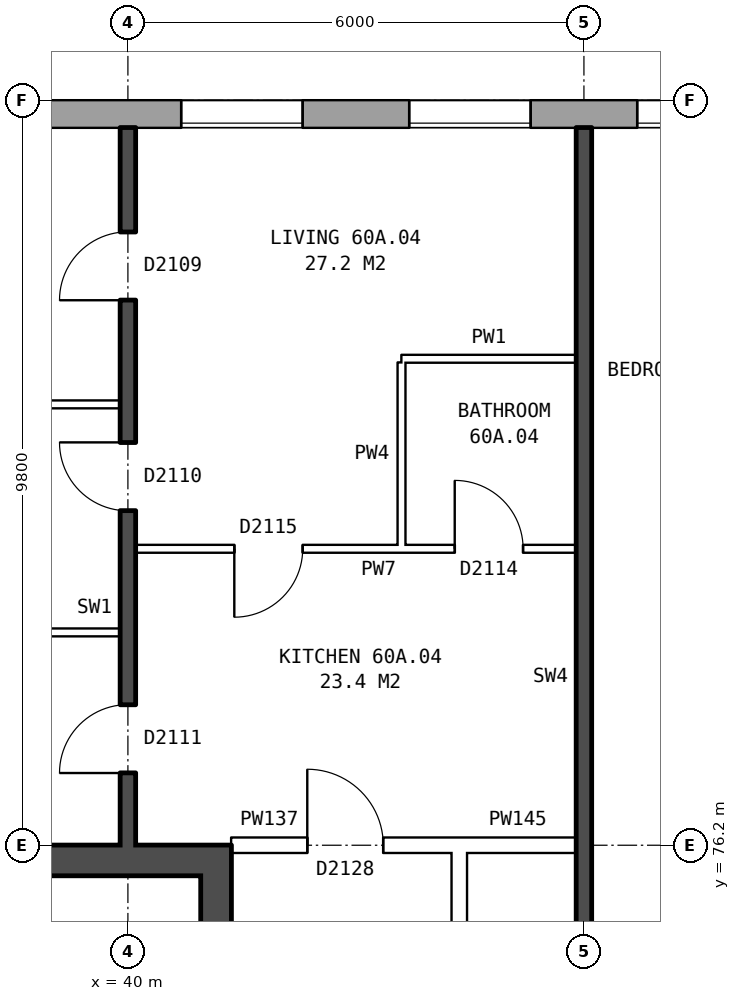
"""IFC4 building model, lengths in metres.
Left out: names, types, materials, properties, quantities, classifications, styles, units other than length and angle.
Written with IfcOpenShell. Run it as: python <this file> out.ifc"""

import sys

from ifc_helpers import new_model, si_unit, direction, frame, frame_2d, origin, place, context, subcontext, project, spatial, rectangle, extrude, element, fill, save


model = new_model("IFC4")
c1 = context("Model", 3, precision=1e-05, world=origin(), true_north=direction((0.0, 1.0)))
c2 = subcontext(c1, "Body", "Model", "MODEL_VIEW")
j1 = project(units=[si_unit("LENGTHUNIT", "METRE"), si_unit("PLANEANGLEUNIT", "RADIAN")], contexts=[c1])
p1 = place(None, origin())
s1 = spatial("IfcSite", under=j1, at=p1, CompositionType="ELEMENT")
p2 = place(p1, origin())
s2 = spatial("IfcBuilding", under=s1, at=p2, CompositionType="ELEMENT")
p3 = place(p2, frame((0.0, 0.0, 212.1)))
s3 = spatial("IfcBuildingStorey", under=s2, at=p3, CompositionType="ELEMENT", Elevation=212.1)
p4 = place(p3, frame((74.95, 85.82, 0.0), z_axis=(0.0, 0.0, 1.0), x_axis=(-1.0, 0.0, 0.0)))
e1 = element("IfcWall", 1, at=p4, inside=s3, PredefinedType="STANDARD", context=c2, shape_type="SweptSolid", body=[
    extrude(rectangle(XDim=39.875, YDim=0.36, at=frame_2d((19.938, 0.0))), origin(), (0.0, 0.0, 1.0), 2.85),
])
p5 = place(p4, frame((2.65, 0.0, 0.8)))
e2 = element("IfcOpeningElement", 2, at=p5, cuts=e1, PredefinedType="OPENING", context=c2, shape_type="SweptSolid", body=[
    extrude(rectangle(XDim=1.6, YDim=1.8, at=frame_2d((0.8, 0.9))), frame((0.0, 0.19, 0.0), z_axis=(0.0, -1.0, 0.0), x_axis=(1.0, 0.0, 0.0)), (0.0, 0.0, 1.0), 0.38),
])
p6 = place(p4, frame((5.15, 0.0, 1.5)))
e3 = element("IfcOpeningElement", 3, at=p6, cuts=e1, PredefinedType="OPENING", context=c2, shape_type="SweptSolid", body=[
    extrude(rectangle(XDim=0.6, YDim=0.9, at=frame_2d((0.3, 0.45))), frame((0.0, 0.19, 0.0), z_axis=(0.0, -1.0, 0.0), x_axis=(1.0, 0.0, 0.0)), (0.0, 0.0, 1.0), 0.38),
])
p7 = place(p4, frame((8.65, 0.0, 0.8)))
e4 = element("IfcOpeningElement", 4, at=p7, cuts=e1, PredefinedType="OPENING", context=c2, shape_type="SweptSolid", body=[
    extrude(rectangle(XDim=1.6, YDim=1.8, at=frame_2d((0.8, 0.9))), frame((0.0, 0.19, 0.0), z_axis=(0.0, -1.0, 0.0), x_axis=(1.0, 0.0, 0.0)), (0.0, 0.0, 1.0), 0.38),
])
p8 = place(p4, frame((11.65, 0.0, 0.8)))
e5 = element("IfcOpeningElement", 5, at=p8, cuts=e1, PredefinedType="OPENING", context=c2, shape_type="SweptSolid", body=[
    extrude(rectangle(XDim=1.6, YDim=1.8, at=frame_2d((0.8, 0.9))), frame((0.0, 0.19, 0.0), z_axis=(0.0, -1.0, 0.0), x_axis=(1.0, 0.0, 0.0)), (0.0, 0.0, 1.0), 0.38),
])
p9 = place(p4, frame((14.65, 0.0, 0.8)))
e6 = element("IfcOpeningElement", 6, at=p9, cuts=e1, PredefinedType="OPENING", context=c2, shape_type="SweptSolid", body=[
    extrude(rectangle(XDim=1.6, YDim=1.8, at=frame_2d((0.8, 0.9))), frame((0.0, 0.19, 0.0), z_axis=(0.0, -1.0, 0.0), x_axis=(1.0, 0.0, 0.0)), (0.0, 0.0, 1.0), 0.38),
])
p10 = place(p4, frame((17.65, 0.0, 0.8)))
e7 = element("IfcOpeningElement", 7, at=p10, cuts=e1, PredefinedType="OPENING", context=c2, shape_type="SweptSolid", body=[
    extrude(rectangle(XDim=1.6, YDim=1.8, at=frame_2d((0.8, 0.9))), frame((0.0, 0.19, 0.0), z_axis=(0.0, -1.0, 0.0), x_axis=(1.0, 0.0, 0.0)), (0.0, 0.0, 1.0), 0.38),
])
p11 = place(p4, frame((20.65, 0.0, 0.8)))
e8 = element("IfcOpeningElement", 8, at=p11, cuts=e1, PredefinedType="OPENING", context=c2, shape_type="SweptSolid", body=[
    extrude(rectangle(XDim=1.6, YDim=1.8, at=frame_2d((0.8, 0.9))), frame((0.0, 0.19, 0.0), z_axis=(0.0, -1.0, 0.0), x_axis=(1.0, 0.0, 0.0)), (0.0, 0.0, 1.0), 0.38),
])
p12 = place(p4, frame((23.65, 0.0, 0.8)))
e9 = element("IfcOpeningElement", 9, at=p12, cuts=e1, PredefinedType="OPENING", context=c2, shape_type="SweptSolid", body=[
    extrude(rectangle(XDim=1.6, YDim=1.8, at=frame_2d((0.8, 0.9))), frame((0.0, 0.19, 0.0), z_axis=(0.0, -1.0, 0.0), x_axis=(1.0, 0.0, 0.0)), (0.0, 0.0, 1.0), 0.38),
])
p13 = place(p4, frame((26.65, 0.0, 0.8)))
e10 = element("IfcOpeningElement", 10, at=p13, cuts=e1, PredefinedType="OPENING", context=c2, shape_type="SweptSolid", body=[
    extrude(rectangle(XDim=1.6, YDim=1.8, at=frame_2d((0.8, 0.9))), frame((0.0, 0.19, 0.0), z_axis=(0.0, -1.0, 0.0), x_axis=(1.0, 0.0, 0.0)), (0.0, 0.0, 1.0), 0.38),
])
p14 = place(p4, frame((29.65, 0.0, 0.8)))
e11 = element("IfcOpeningElement", 11, at=p14, cuts=e1, PredefinedType="OPENING", context=c2, shape_type="SweptSolid", body=[
    extrude(rectangle(XDim=1.6, YDim=1.8, at=frame_2d((0.8, 0.9))), frame((0.0, 0.19, 0.0), z_axis=(0.0, -1.0, 0.0), x_axis=(1.0, 0.0, 0.0)), (0.0, 0.0, 1.0), 0.38),
])
p15 = place(p4, frame((32.65, 0.0, 0.8)))
e12 = element("IfcOpeningElement", 12, at=p15, cuts=e1, PredefinedType="OPENING", context=c2, shape_type="SweptSolid", body=[
    extrude(rectangle(XDim=1.6, YDim=1.8, at=frame_2d((0.8, 0.9))), frame((0.0, 0.19, 0.0), z_axis=(0.0, -1.0, 0.0), x_axis=(1.0, 0.0, 0.0)), (0.0, 0.0, 1.0), 0.38),
])
p16 = place(p4, frame((36.35, 0.0, 1.1)))
e13 = element("IfcOpeningElement", 13, at=p16, cuts=e1, PredefinedType="OPENING", context=c2, shape_type="SweptSolid", body=[
    extrude(rectangle(XDim=0.8, YDim=1.5, at=frame_2d((0.4, 0.75))), frame((0.0, 0.19, 0.0), z_axis=(0.0, -1.0, 0.0), x_axis=(1.0, 0.0, 0.0)), (0.0, 0.0, 1.0), 0.38),
])
p17 = place(p4, frame((7.45, 0.0, 0.8)))
e14 = element("IfcOpeningElement", 14, at=p17, cuts=e1, PredefinedType="OPENING", context=c2, shape_type="SweptSolid", body=[
    extrude(rectangle(XDim=0.8, YDim=1.5, at=frame_2d((0.4, 0.75))), frame((0.0, 0.19, 0.0), z_axis=(0.0, -1.0, 0.0), x_axis=(1.0, 0.0, 0.0)), (0.0, 0.0, 1.0), 0.38),
])
p18 = place(p4, frame((37.45, 0.0, 0.8)))
e15 = element("IfcOpeningElement", 15, at=p18, cuts=e1, PredefinedType="OPENING", context=c2, shape_type="SweptSolid", body=[
    extrude(rectangle(XDim=1.4, YDim=1.8, at=frame_2d((0.7, 0.9))), frame((0.0, 0.19, 0.0), z_axis=(0.0, -1.0, 0.0), x_axis=(1.0, 0.0, 0.0)), (0.0, 0.0, 1.0), 0.38),
])
p19 = place(p3, frame((41.16, 76.2, 0.0), z_axis=(0.0, 0.0, 1.0), x_axis=(0.0, -1.0, 0.0)))
e16 = element("IfcWall", 16, at=p19, inside=s3, PredefinedType="SHEAR", context=c2, shape_type="SweptSolid", body=[
    extrude(rectangle(XDim=12.4, YDim=0.4, at=frame_2d((6.2, 0.0))), origin(), (0.0, 0.0, 1.0), 2.85),
])
p20 = place(p19, frame((1.325, 0.0, 0.0)))
e17 = element("IfcOpeningElement", 17, at=p20, cuts=e16, PredefinedType="OPENING", context=c2, shape_type="SweptSolid", body=[
    extrude(rectangle(XDim=1.1, YDim=2.1, at=frame_2d((0.55, 1.05))), frame((0.0, 0.21, 0.0), z_axis=(0.0, -1.0, 0.0), x_axis=(1.0, 0.0, 0.0)), (0.0, 0.0, 1.0), 0.42),
])
p21 = place(p19, frame((4.575, 0.0, 0.0)))
e18 = element("IfcOpeningElement", 18, at=p21, cuts=e16, PredefinedType="OPENING", context=c2, shape_type="SweptSolid", body=[
    extrude(rectangle(XDim=0.85, YDim=2.1, at=frame_2d((0.425, 1.05))), frame((0.0, 0.21, 0.0), z_axis=(0.0, -1.0, 0.0), x_axis=(1.0, 0.0, 0.0)), (0.0, 0.0, 1.0), 0.42),
])
p22 = place(p19, frame((7.825, 0.0, 0.0)))
e19 = element("IfcOpeningElement", 19, at=p22, cuts=e16, PredefinedType="OPENING", context=c2, shape_type="SweptSolid", body=[
    extrude(rectangle(XDim=0.85, YDim=2.1, at=frame_2d((0.425, 1.05))), frame((0.0, 0.21, 0.0), z_axis=(0.0, -1.0, 0.0), x_axis=(1.0, 0.0, 0.0)), (0.0, 0.0, 1.0), 0.42),
])
p23 = place(p19, frame((9.9, 0.0, 0.0)))
e20 = element("IfcOpeningElement", 20, at=p23, cuts=e16, PredefinedType="OPENING", context=c2, shape_type="SweptSolid", body=[
    extrude(rectangle(XDim=1.1, YDim=2.1, at=frame_2d((0.55, 1.05))), frame((0.0, 0.21, 0.0), z_axis=(0.0, -1.0, 0.0), x_axis=(1.0, 0.0, 0.0)), (0.0, 0.0, 1.0), 0.42),
])
p24 = place(p3, frame((40.96, 76.0, 0.0), z_axis=(0.0, 0.0, 1.0), x_axis=(-1.0, 0.0, 0.0)))
e21 = element("IfcWall", 21, at=p24, inside=s3, PredefinedType="SHEAR", context=c2, shape_type="SweptSolid", body=[
    extrude(rectangle(XDim=8.2, YDim=0.4, at=frame_2d((4.1, 0.0))), origin(), (0.0, 0.0, 1.0), 2.85),
])
p25 = place(p3, frame((44.36, 63.9, 0.0), z_axis=(0.0, 0.0, 1.0), x_axis=(0.0, 1.0, 0.0)))
e22 = element("IfcWall", 22, at=p25, inside=s3, PredefinedType="PARTITIONING", context=c2, shape_type="SweptSolid", body=[
    extrude(rectangle(XDim=12.2, YDim=0.2, at=frame_2d((6.1, 0.0))), origin(), (0.0, 0.0, 1.0), 2.85),
])
p26 = place(p25, frame((5.1, 0.0, 0.0)))
e23 = element("IfcOpeningElement", 23, at=p26, cuts=e22, PredefinedType="OPENING", context=c2, shape_type="SweptSolid", body=[
    extrude(rectangle(XDim=2.0, YDim=2.1, at=frame_2d((1.0, 1.05))), frame((0.0, 0.11, 0.0), z_axis=(0.0, -1.0, 0.0), x_axis=(1.0, 0.0, 0.0)), (0.0, 0.0, 1.0), 0.22),
])
p27 = place(p3, frame((41.36, 76.2, 0.0), z_axis=(0.0, 0.0, 1.0), x_axis=(1.0, 0.0, 0.0)))
e24 = element("IfcWall", 24, at=p27, inside=s3, PredefinedType="PARTITIONING", context=c2, shape_type="SweptSolid", body=[
    extrude(rectangle(XDim=3.0, YDim=0.2, at=frame_2d((1.5, 0.0))), origin(), (0.0, 0.0, 1.0), 2.85),
])
p28 = place(p27, frame((1.0, 0.0, 0.0)))
e25 = element("IfcOpeningElement", 25, at=p28, cuts=e24, PredefinedType="OPENING", context=c2, shape_type="SweptSolid", body=[
    extrude(rectangle(XDim=1.0, YDim=2.1, at=frame_2d((0.5, 1.05))), frame((0.0, 0.11, 0.0), z_axis=(0.0, -1.0, 0.0), x_axis=(1.0, 0.0, 0.0)), (0.0, 0.0, 1.0), 0.22),
])
p29 = place(p3, frame((44.36, 76.2, 0.0), z_axis=(0.0, 0.0, 1.0), x_axis=(1.0, 0.0, 0.0)))
e26 = element("IfcWall", 26, at=p29, inside=s3, PredefinedType="PARTITIONING", context=c2, shape_type="SweptSolid", body=[
    extrude(rectangle(XDim=1.54, YDim=0.2, at=frame_2d((0.77, 0.0))), origin(), (0.0, 0.0, 1.0), 2.85),
])
p30 = place(p3, frame((32.36, 79.0, 0.0), z_axis=(0.0, 0.0, 1.0), x_axis=(1.0, 0.0, 0.0)))
e27 = element("IfcWall", 27, at=p30, inside=s3, PredefinedType="PARTITIONING", context=c2, shape_type="SweptSolid", body=[
    extrude(rectangle(XDim=7.54, YDim=0.1, at=frame_2d((3.77, 0.0))), origin(), (0.0, 0.0, 1.0), 2.85),
])
p31 = place(p3, frame((40.1, 80.1, 0.0), z_axis=(0.0, 0.0, 1.0), x_axis=(1.0, 0.0, 0.0)))
e28 = element("IfcWall", 28, at=p31, inside=s3, PredefinedType="PARTITIONING", context=c2, shape_type="SweptSolid", body=[
    extrude(rectangle(XDim=5.8, YDim=0.1, at=frame_2d((2.9, 0.0))), origin(), (0.0, 0.0, 1.0), 2.85),
])
p32 = place(p31, frame((1.3, 0.0, 0.0)))
e29 = element("IfcOpeningElement", 29, at=p32, cuts=e28, PredefinedType="OPENING", context=c2, shape_type="SweptSolid", body=[
    extrude(rectangle(XDim=0.9, YDim=2.1, at=frame_2d((0.45, 1.05))), frame((0.0, 0.06, 0.0), z_axis=(0.0, -1.0, 0.0), x_axis=(1.0, 0.0, 0.0)), (0.0, 0.0, 1.0), 0.12),
])
p33 = place(p31, frame((4.2, 0.0, 0.0)))
e30 = element("IfcOpeningElement", 30, at=p33, cuts=e28, PredefinedType="OPENING", context=c2, shape_type="SweptSolid", body=[
    extrude(rectangle(XDim=0.9, YDim=2.1, at=frame_2d((0.45, 1.05))), frame((0.0, 0.06, 0.0), z_axis=(0.0, -1.0, 0.0), x_axis=(1.0, 0.0, 0.0)), (0.0, 0.0, 1.0), 0.12),
])
p34 = place(p3, frame((32.36, 82.0, 0.0), z_axis=(0.0, 0.0, 1.0), x_axis=(1.0, 0.0, 0.0)))
e31 = element("IfcWall", 31, at=p34, inside=s3, PredefinedType="PARTITIONING", context=c2, shape_type="SweptSolid", body=[
    extrude(rectangle(XDim=7.54, YDim=0.1, at=frame_2d((3.77, 0.0))), origin(), (0.0, 0.0, 1.0), 2.85),
])
p35 = place(p3, frame((43.6, 82.6, 0.0), z_axis=(0.0, 0.0, 1.0), x_axis=(1.0, 0.0, 0.0)))
e32 = element("IfcWall", 32, at=p35, inside=s3, PredefinedType="PARTITIONING", context=c2, shape_type="SweptSolid", body=[
    extrude(rectangle(XDim=2.3, YDim=0.1, at=frame_2d((1.15, 0.0))), origin(), (0.0, 0.0, 1.0), 2.85),
])
p36 = place(p3, frame((40.0, 76.2, 0.0), z_axis=(0.0, 0.0, 1.0), x_axis=(0.0, 1.0, 0.0)))
e33 = element("IfcWall", 33, at=p36, inside=s3, PredefinedType="SOLIDWALL", context=c2, shape_type="SweptSolid", body=[
    extrude(rectangle(XDim=9.44, YDim=0.2, at=frame_2d((4.72, 0.0))), origin(), (0.0, 0.0, 1.0), 2.85),
])
p37 = place(p36, frame((7.17, 0.0, 0.0)))
e34 = element("IfcOpeningElement", 34, at=p37, cuts=e33, PredefinedType="OPENING", context=c2, shape_type="SweptSolid", body=[
    extrude(rectangle(XDim=0.9, YDim=2.1, at=frame_2d((0.45, 1.05))), frame((0.0, 0.11, 0.0), z_axis=(0.0, -1.0, 0.0), x_axis=(1.0, 0.0, 0.0)), (0.0, 0.0, 1.0), 0.22),
])
p38 = place(p36, frame((4.4, 0.0, 0.0)))
e35 = element("IfcOpeningElement", 35, at=p38, cuts=e33, PredefinedType="OPENING", context=c2, shape_type="SweptSolid", body=[
    extrude(rectangle(XDim=0.9, YDim=2.1, at=frame_2d((0.45, 1.05))), frame((0.0, 0.11, 0.0), z_axis=(0.0, -1.0, 0.0), x_axis=(1.0, 0.0, 0.0)), (0.0, 0.0, 1.0), 0.22),
])
p39 = place(p36, frame((0.95, 0.0, 0.0)))
e36 = element("IfcOpeningElement", 36, at=p39, cuts=e33, PredefinedType="OPENING", context=c2, shape_type="SweptSolid", body=[
    extrude(rectangle(XDim=0.9, YDim=2.1, at=frame_2d((0.45, 1.05))), frame((0.0, 0.11, 0.0), z_axis=(0.0, -1.0, 0.0), x_axis=(1.0, 0.0, 0.0)), (0.0, 0.0, 1.0), 0.22),
])
p40 = place(p3, frame((43.6, 80.15, 0.0), z_axis=(0.0, 0.0, 1.0), x_axis=(0.0, 1.0, 0.0)))
e37 = element("IfcWall", 37, at=p40, inside=s3, PredefinedType="PARTITIONING", context=c2, shape_type="SweptSolid", body=[
    extrude(rectangle(XDim=2.4, YDim=0.1, at=frame_2d((1.2, 0.0))), origin(), (0.0, 0.0, 1.0), 2.85),
])
p41 = place(p3, frame((46.0, 71.2, 0.0), z_axis=(0.0, 0.0, 1.0), x_axis=(0.0, 1.0, 0.0)))
e38 = element("IfcWall", 38, at=p41, inside=s3, PredefinedType="SOLIDWALL", context=c2, shape_type="SweptSolid", body=[
    extrude(rectangle(XDim=14.44, YDim=0.2, at=frame_2d((7.22, 0.0))), origin(), (0.0, 0.0, 1.0), 2.85),
])
p42 = place(p13, origin())
e39 = element("IfcWindow", 39, at=p42, inside=s3, PartitioningType="SINGLE_PANEL", PredefinedType="WINDOW", context=c2, shape_type="SweptSolid", body=[
    extrude(rectangle(XDim=1.6, YDim=1.8, at=frame_2d((0.8, 0.9))), frame((0.0, 0.15, 0.0), z_axis=(0.0, -1.0, 0.0), x_axis=(1.0, 0.0, 0.0)), (0.0, 0.0, 1.0), 0.06),
])
fill(e10, e39)
p43 = place(p14, origin())
e40 = element("IfcWindow", 40, at=p43, inside=s3, PartitioningType="SINGLE_PANEL", PredefinedType="WINDOW", context=c2, shape_type="SweptSolid", body=[
    extrude(rectangle(XDim=1.6, YDim=1.8, at=frame_2d((0.8, 0.9))), frame((0.0, 0.15, 0.0), z_axis=(0.0, -1.0, 0.0), x_axis=(1.0, 0.0, 0.0)), (0.0, 0.0, 1.0), 0.06),
])
fill(e11, e40)
p44 = place(p15, origin())
e41 = element("IfcWindow", 41, at=p44, inside=s3, PartitioningType="SINGLE_PANEL", PredefinedType="WINDOW", context=c2, shape_type="SweptSolid", body=[
    extrude(rectangle(XDim=1.6, YDim=1.8, at=frame_2d((0.8, 0.9))), frame((0.0, 0.15, 0.0), z_axis=(0.0, -1.0, 0.0), x_axis=(1.0, 0.0, 0.0)), (0.0, 0.0, 1.0), 0.06),
])
fill(e12, e41)
p45 = place(p37, origin())
e42 = element("IfcDoor", 42, at=p45, inside=s3, OperationType="SINGLE_SWING_LEFT", PredefinedType="DOOR", context=c2, shape_type="SweptSolid", body=[
    extrude(rectangle(XDim=0.9, YDim=2.1, at=frame_2d((0.45, 1.05))), frame((0.0, 0.025, 0.0), z_axis=(0.0, -1.0, 0.0), x_axis=(1.0, 0.0, 0.0)), (0.0, 0.0, 1.0), 0.05),
])
fill(e34, e42)
p46 = place(p38, origin())
e43 = element("IfcDoor", 43, at=p46, inside=s3, OperationType="SINGLE_SWING_RIGHT", PredefinedType="DOOR", context=c2, shape_type="SweptSolid", body=[
    extrude(rectangle(XDim=0.9, YDim=2.1, at=frame_2d((0.45, 1.05))), frame((0.0, 0.025, 0.0), z_axis=(0.0, -1.0, 0.0), x_axis=(1.0, 0.0, 0.0)), (0.0, 0.0, 1.0), 0.05),
])
fill(e35, e43)
p47 = place(p39, origin())
e44 = element("IfcDoor", 44, at=p47, inside=s3, OperationType="SINGLE_SWING_LEFT", PredefinedType="DOOR", context=c2, shape_type="SweptSolid", body=[
    extrude(rectangle(XDim=0.9, YDim=2.1, at=frame_2d((0.45, 1.05))), frame((0.0, 0.025, 0.0), z_axis=(0.0, -1.0, 0.0), x_axis=(1.0, 0.0, 0.0)), (0.0, 0.0, 1.0), 0.05),
])
fill(e36, e44)
p48 = place(p28, origin())
e45 = element("IfcDoor", 45, at=p48, inside=s3, OperationType="SINGLE_SWING_LEFT", PredefinedType="DOOR", context=c2, shape_type="SweptSolid", body=[
    extrude(rectangle(XDim=1.0, YDim=2.1, at=frame_2d((0.5, 1.05))), frame((0.0, 0.025, 0.0), z_axis=(0.0, -1.0, 0.0), x_axis=(1.0, 0.0, 0.0)), (0.0, 0.0, 1.0), 0.05),
])
fill(e25, e45)
p49 = place(p32, frame((0.9, 0.0, 0.0), z_axis=(0.0, 0.0, 1.0), x_axis=(-1.0, 0.0, 0.0)))
e46 = element("IfcDoor", 46, at=p49, inside=s3, OperationType="SINGLE_SWING_RIGHT", PredefinedType="DOOR", context=c2, shape_type="SweptSolid", body=[
    extrude(rectangle(XDim=0.9, YDim=2.1, at=frame_2d((0.45, 1.05))), frame((0.0, 0.025, 0.0), z_axis=(0.0, -1.0, 0.0), x_axis=(1.0, 0.0, 0.0)), (0.0, 0.0, 1.0), 0.05),
])
fill(e29, e46)
p50 = place(p33, origin())
e47 = element("IfcDoor", 47, at=p50, inside=s3, OperationType="SINGLE_SWING_LEFT", PredefinedType="DOOR", context=c2, shape_type="SweptSolid", body=[
    extrude(rectangle(XDim=0.9, YDim=2.1, at=frame_2d((0.45, 1.05))), frame((0.0, 0.025, 0.0), z_axis=(0.0, -1.0, 0.0), x_axis=(1.0, 0.0, 0.0)), (0.0, 0.0, 1.0), 0.05),
])
fill(e30, e47)
save(model, sys.argv[1])
